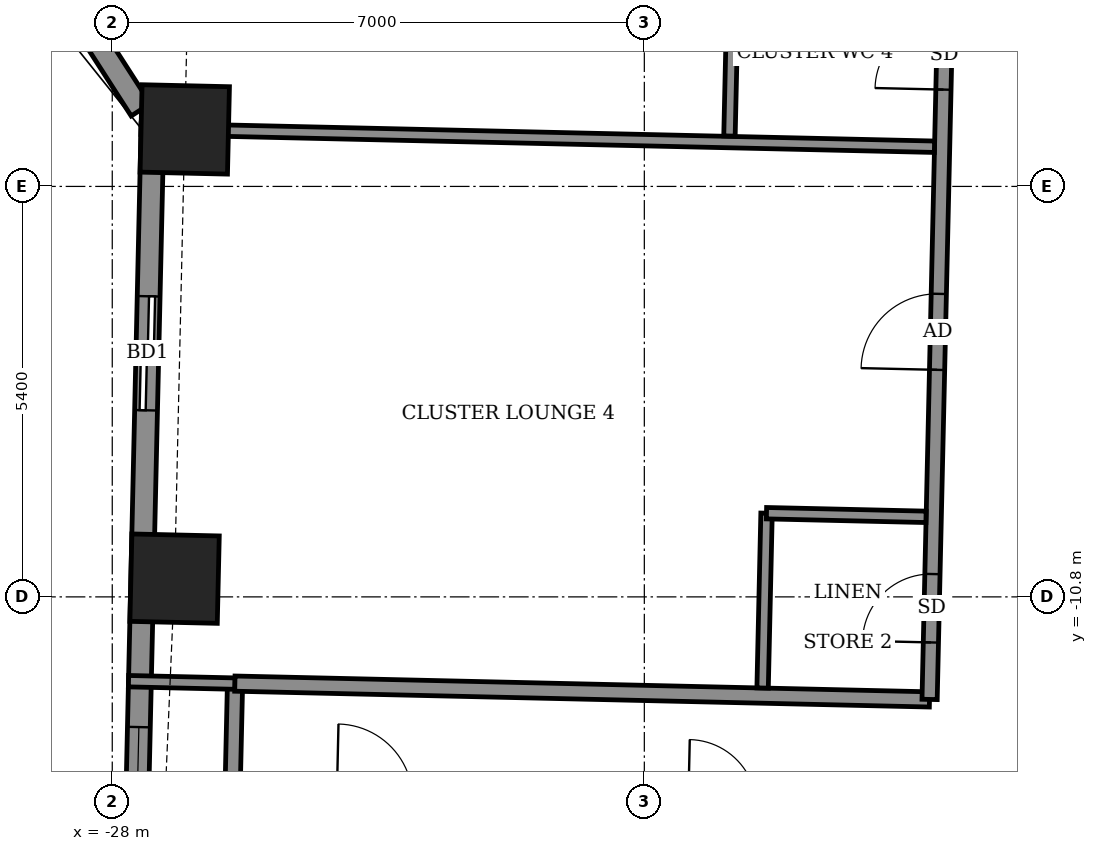
"""IFC4 building model, lengths in metres.
Left out: names, types, materials, properties, quantities, classifications, styles, units other than length and angle.
Written with IfcOpenShell. Run it as: python <this file> out.ifc"""

import sys

from ifc_helpers import new_model, si_unit, direction, frame, frame_2d, origin, origin_2d, place, context, subcontext, project, spatial, rectangle, extrude, element, fill, save


model = new_model("IFC4")
c1 = context("Model", 3, precision=1e-05, world=origin(), true_north=direction((0.0, 1.0)))
c2 = subcontext(c1, "Body", "Model", "MODEL_VIEW")
j1 = project(units=[si_unit("LENGTHUNIT", "METRE"), si_unit("PLANEANGLEUNIT", "RADIAN")], contexts=[c1])
p1 = place(None, origin())
s1 = spatial("IfcSite", under=j1, at=p1, CompositionType="ELEMENT")
p2 = place(p1, origin())
s2 = spatial("IfcBuilding", under=s1, at=p2, CompositionType="ELEMENT")
p3 = place(p2, frame((0.0, 0.0, 201.5)))
s3 = spatial("IfcBuildingStorey", under=s2, at=p3, CompositionType="ELEMENT", Elevation=201.5)
for number, where, z_axis, x_axis in (
    (1, (-27.046, -4.65, -0.55), (0.0, 0.0, 1.0), (-0.023, -1.0, 0.0)),
    (2, (-27.18, -10.56, -0.55), (0.0, 0.0, 1.0), (-0.023, -1.0, 0.0)),
):
    element("IfcColumn", number, at=place(p3, frame(where, z_axis=z_axis, x_axis=x_axis)), inside=s3, PredefinedType="COLUMN", context=c2, shape_type="SweptSolid", body=[
        extrude(rectangle(XDim=1.15, YDim=1.15, at=origin_2d()), origin(), (0.0, 0.0, 1.0), 3.6),
    ])
p4 = place(p3, frame((-29.555, -1.389, 0.0), z_axis=(0.0, 0.0, 1.0), x_axis=(0.540622779574, -0.8412651248, 0.0)))
e3 = element("IfcWall", 3, at=p4, inside=s3, PredefinedType="SOLIDWALL", context=c2, shape_type="SweptSolid", body=[
    extrude(rectangle(XDim=3.57, YDim=0.3, at=frame_2d((1.785, 0.0))), origin(), (0.0, 0.0, 1.0), 3.05),
])
p5 = place(p4, frame((0.338, 0.0, 0.9)))
e4 = element("IfcOpeningElement", 4, at=p5, cuts=e3, PredefinedType="OPENING", context=c2, shape_type="SweptSolid", body=[
    extrude(rectangle(XDim=1.2, YDim=1.5, at=frame_2d((0.6, 0.75))), frame((0.0, 0.16, 0.0), z_axis=(0.0, -1.0, 0.0), x_axis=(1.0, 0.0, 0.0)), (0.0, 0.0, 1.0), 0.32),
])
p6 = place(p3, frame((-27.47, -4.585, 0.0), z_axis=(0.0, 0.0, 1.0), x_axis=(-0.022686419344, -0.999742630069, 0.0)))
e5 = element("IfcWall", 5, at=p6, inside=s3, PredefinedType="SOLIDWALL", context=c2, shape_type="SweptSolid", body=[
    extrude(rectangle(XDim=11.73, YDim=0.3, at=frame_2d((5.865, 0.0))), origin(), (0.0, 0.0, 1.0), 2.55),
])
p7 = place(p6, frame((2.261, 0.0, 0.0)))
e6 = element("IfcOpeningElement", 6, at=p7, cuts=e5, PredefinedType="OPENING", context=c2, shape_type="SweptSolid", body=[
    extrude(rectangle(XDim=1.5, YDim=2.4, at=frame_2d((0.75, 1.2))), frame((0.0, 0.16, 0.0), z_axis=(0.0, -1.0, 0.0), x_axis=(1.0, 0.0, 0.0)), (0.0, 0.0, 1.0), 0.32),
])
p8 = place(p6, frame((7.93, 0.0, 0.9)))
e7 = element("IfcOpeningElement", 7, at=p8, cuts=e5, PredefinedType="OPENING", context=c2, shape_type="SweptSolid", body=[
    extrude(rectangle(XDim=2.4, YDim=1.5, at=frame_2d((1.2, 0.75))), frame((0.0, 0.16, 0.0), z_axis=(0.0, -1.0, 0.0), x_axis=(1.0, 0.0, 0.0)), (0.0, 0.0, 1.0), 0.32),
])
p9 = place(p3, frame((-26.419, -13.441, 0.0), z_axis=(0.0, 0.0, 1.0), x_axis=(0.022617910375, 0.999744182344, 0.0)))
e8 = element("IfcWall", 8, at=p9, inside=s3, PredefinedType="PARTITIONING", context=c2, shape_type="SweptSolid", body=[
    extrude(rectangle(XDim=1.5, YDim=0.2, at=frame_2d((0.75, 0.0))), origin(), (0.0, 0.0, 1.0), 3.05),
])
p10 = place(p3, frame((-27.786, -11.909, 0.0), z_axis=(0.0, 0.0, 1.0), x_axis=(0.999740216184, -0.022792545827, 0.0)))
e9 = element("IfcWall", 9, at=p10, inside=s3, PredefinedType="PARTITIONING", context=c2, shape_type="SweptSolid", body=[
    extrude(rectangle(XDim=1.403, YDim=0.15, at=frame_2d((0.702, 0.0))), origin(), (0.0, 0.0, 1.0), 2.55),
])
p11 = place(p3, frame((-26.387, -11.941, 0.0), z_axis=(0.0, 0.0, 1.0), x_axis=(0.999741076645, -0.022754772455, 0.0)))
e10 = element("IfcWall", 10, at=p11, inside=s3, PredefinedType="PARTITIONING", context=c2, shape_type="SweptSolid", body=[
    extrude(rectangle(XDim=9.141, YDim=0.2, at=frame_2d((4.571, 0.0))), origin(), (0.0, 0.0, 1.0), 3.05),
])
p12 = place(p3, frame((-19.444, -11.999, 0.0), z_axis=(0.0, 0.0, 1.0), x_axis=(0.022603288534, 0.999744513037, 0.0)))
e11 = element("IfcWall", 11, at=p12, inside=s3, PredefinedType="PARTITIONING", context=c2, shape_type="SweptSolid", body=[
    extrude(rectangle(XDim=2.301, YDim=0.15, at=frame_2d((1.15, 0.0))), origin(), (0.0, 0.0, 1.0), 3.05),
])
p13 = place(p3, frame((-17.247, -12.149, 0.0), z_axis=(0.0, 0.0, 1.0), x_axis=(0.022698146637, 0.999742363881, 0.0)))
e12 = element("IfcWall", 12, at=p13, inside=s3, PredefinedType="PARTITIONING", context=c2, shape_type="SweptSolid", body=[
    extrude(rectangle(XDim=28.374, YDim=0.2, at=frame_2d((14.187, 0.0))), origin(), (0.0, 0.0, 1.0), 3.05),
])
p14 = place(p13, frame((23.0, 0.0, 0.0)))
e13 = element("IfcOpeningElement", 13, at=p14, cuts=e12, PredefinedType="OPENING", context=c2, shape_type="SweptSolid", body=[
    extrude(rectangle(XDim=1.0, YDim=2.1, at=frame_2d((0.5, 1.05))), frame((0.0, 0.11, 0.0), z_axis=(0.0, -1.0, 0.0), x_axis=(1.0, 0.0, 0.0)), (0.0, 0.0, 1.0), 0.22),
])
p15 = place(p13, frame((26.724, 0.0, 0.0)))
e14 = element("IfcOpeningElement", 14, at=p15, cuts=e12, PredefinedType="OPENING", context=c2, shape_type="SweptSolid", body=[
    extrude(rectangle(XDim=0.9, YDim=2.1, at=frame_2d((0.45, 1.05))), frame((0.0, 0.11, 0.0), z_axis=(0.0, -1.0, 0.0), x_axis=(1.0, 0.0, 0.0)), (0.0, 0.0, 1.0), 0.22),
])
p16 = place(p13, frame((17.025, 0.0, 0.0)))
e15 = element("IfcOpeningElement", 15, at=p16, cuts=e12, PredefinedType="OPENING", context=c2, shape_type="SweptSolid", body=[
    extrude(rectangle(XDim=1.0, YDim=2.1, at=frame_2d((0.5, 1.05))), frame((0.0, 0.11, 0.0), z_axis=(0.0, -1.0, 0.0), x_axis=(1.0, 0.0, 0.0)), (0.0, 0.0, 1.0), 0.22),
])
p17 = place(p13, frame((19.275, 0.0, 0.0)))
e16 = element("IfcOpeningElement", 16, at=p17, cuts=e12, PredefinedType="OPENING", context=c2, shape_type="SweptSolid", body=[
    extrude(rectangle(XDim=0.9, YDim=2.1, at=frame_2d((0.45, 1.05))), frame((0.0, 0.11, 0.0), z_axis=(0.0, -1.0, 0.0), x_axis=(1.0, 0.0, 0.0)), (0.0, 0.0, 1.0), 0.22),
])
p18 = place(p13, frame((14.95, 0.0, 0.0)))
e17 = element("IfcOpeningElement", 17, at=p18, cuts=e12, PredefinedType="OPENING", context=c2, shape_type="SweptSolid", body=[
    extrude(rectangle(XDim=1.0, YDim=2.1, at=frame_2d((0.5, 1.05))), frame((0.0, 0.11, 0.0), z_axis=(0.0, -1.0, 0.0), x_axis=(1.0, 0.0, 0.0)), (0.0, 0.0, 1.0), 0.22),
])
p19 = place(p13, frame((12.625, 0.0, 0.0)))
e18 = element("IfcOpeningElement", 18, at=p19, cuts=e12, PredefinedType="OPENING", context=c2, shape_type="SweptSolid", body=[
    extrude(rectangle(XDim=0.9, YDim=2.1, at=frame_2d((0.45, 1.05))), frame((0.0, 0.11, 0.0), z_axis=(0.0, -1.0, 0.0), x_axis=(1.0, 0.0, 0.0)), (0.0, 0.0, 1.0), 0.22),
])
p20 = place(p13, frame((10.275, 0.0, 0.0)))
e19 = element("IfcOpeningElement", 19, at=p20, cuts=e12, PredefinedType="OPENING", context=c2, shape_type="SweptSolid", body=[
    extrude(rectangle(XDim=1.0, YDim=2.1, at=frame_2d((0.5, 1.05))), frame((0.0, 0.11, 0.0), z_axis=(0.0, -1.0, 0.0), x_axis=(1.0, 0.0, 0.0)), (0.0, 0.0, 1.0), 0.22),
])
p21 = place(p13, frame((8.025, 0.0, 0.0)))
e20 = element("IfcOpeningElement", 20, at=p21, cuts=e12, PredefinedType="OPENING", context=c2, shape_type="SweptSolid", body=[
    extrude(rectangle(XDim=0.9, YDim=2.1, at=frame_2d((0.45, 1.05))), frame((0.0, 0.11, 0.0), z_axis=(0.0, -1.0, 0.0), x_axis=(1.0, 0.0, 0.0)), (0.0, 0.0, 1.0), 0.22),
])
p22 = place(p13, frame((4.337, 0.0, 0.0)))
e21 = element("IfcOpeningElement", 21, at=p22, cuts=e12, PredefinedType="OPENING", context=c2, shape_type="SweptSolid", body=[
    extrude(rectangle(XDim=1.0, YDim=2.1, at=frame_2d((0.5, 1.05))), frame((0.0, 0.11, 0.0), z_axis=(0.0, -1.0, 0.0), x_axis=(1.0, 0.0, 0.0)), (0.0, 0.0, 1.0), 0.22),
])
p23 = place(p13, frame((0.75, 0.0, 0.0)))
e22 = element("IfcOpeningElement", 22, at=p23, cuts=e12, PredefinedType="OPENING", context=c2, shape_type="SweptSolid", body=[
    extrude(rectangle(XDim=0.9, YDim=2.1, at=frame_2d((0.45, 1.05))), frame((0.0, 0.11, 0.0), z_axis=(0.0, -1.0, 0.0), x_axis=(1.0, 0.0, 0.0)), (0.0, 0.0, 1.0), 0.22),
])
p24 = place(p3, frame((-19.393, -9.699, 0.0), z_axis=(0.0, 0.0, 1.0), x_axis=(0.999737616439, -0.022906293375, 0.0)))
e23 = element("IfcWall", 23, at=p24, inside=s3, PredefinedType="PARTITIONING", context=c2, shape_type="SweptSolid", body=[
    extrude(rectangle(XDim=2.1, YDim=0.15, at=frame_2d((1.05, 0.0))), origin(), (0.0, 0.0, 1.0), 3.05),
])
p25 = place(p3, frame((-27.621, -4.641, 0.0), z_axis=(0.0, 0.0, 1.0), x_axis=(0.999742728106, -0.022682098664, 0.0)))
e24 = element("IfcWall", 24, at=p25, inside=s3, PredefinedType="PARTITIONING", context=c2, shape_type="SweptSolid", body=[
    extrude(rectangle(XDim=10.441, YDim=0.15, at=frame_2d((5.22, 0.0))), origin(), (0.0, 0.0, 1.0), 3.05),
])
p26 = place(p3, frame((-19.88, -4.737, 0.0), z_axis=(0.0, 0.0, 1.0), x_axis=(0.02279059109, 0.999740260747, 0.0)))
e25 = element("IfcWall", 25, at=p26, inside=s3, PredefinedType="PARTITIONING", context=c2, shape_type="SweptSolid", body=[
    extrude(rectangle(XDim=2.324, YDim=0.15, at=frame_2d((1.162, 0.0))), origin(), (0.0, 0.0, 1.0), 3.05),
])
p27 = place(p7, origin())
e26 = element("IfcDoor", 26, at=p27, inside=s3, OperationType="SLIDING_TO_LEFT", PredefinedType="DOOR", context=c2, shape_type="SweptSolid", body=[
    extrude(rectangle(XDim=1.5, YDim=2.4, at=frame_2d((0.75, 1.2))), frame((0.0, 0.025, 0.0), z_axis=(0.0, -1.0, 0.0), x_axis=(1.0, 0.0, 0.0)), (0.0, 0.0, 1.0), 0.05),
])
fill(e6, e26)
p28 = place(p8, origin())
e27 = element("IfcWindow", 27, at=p28, inside=s3, PartitioningType="DOUBLE_PANEL_VERTICAL", PredefinedType="WINDOW", context=c2, shape_type="SweptSolid", body=[
    extrude(rectangle(XDim=2.4, YDim=1.5, at=frame_2d((1.2, 0.75))), frame((0.0, 0.03, 0.0), z_axis=(0.0, -1.0, 0.0), x_axis=(1.0, 0.0, 0.0)), (0.0, 0.0, 1.0), 0.06),
])
fill(e7, e27)
p29 = place(p21, origin())
e28 = element("IfcDoor", 28, at=p29, inside=s3, OperationType="SINGLE_SWING_LEFT", PredefinedType="DOOR", context=c2, shape_type="SweptSolid", body=[
    extrude(rectangle(XDim=0.9, YDim=2.1, at=frame_2d((0.45, 1.05))), frame((0.0, 0.025, 0.0), z_axis=(0.0, -1.0, 0.0), x_axis=(1.0, 0.0, 0.0)), (0.0, 0.0, 1.0), 0.05),
])
fill(e20, e28)
p30 = place(p22, origin())
e29 = element("IfcDoor", 29, at=p30, inside=s3, OperationType="SINGLE_SWING_LEFT", PredefinedType="DOOR", context=c2, shape_type="SweptSolid", body=[
    extrude(rectangle(XDim=1.0, YDim=2.1, at=frame_2d((0.5, 1.05))), frame((0.0, 0.025, 0.0), z_axis=(0.0, -1.0, 0.0), x_axis=(1.0, 0.0, 0.0)), (0.0, 0.0, 1.0), 0.05),
])
fill(e21, e29)
p31 = place(p23, origin())
e30 = element("IfcDoor", 30, at=p31, inside=s3, OperationType="SINGLE_SWING_RIGHT", PredefinedType="DOOR", context=c2, shape_type="SweptSolid", body=[
    extrude(rectangle(XDim=0.9, YDim=2.1, at=frame_2d((0.45, 1.05))), frame((0.0, 0.025, 0.0), z_axis=(0.0, -1.0, 0.0), x_axis=(1.0, 0.0, 0.0)), (0.0, 0.0, 1.0), 0.05),
])
fill(e22, e30)
save(model, sys.argv[1])
